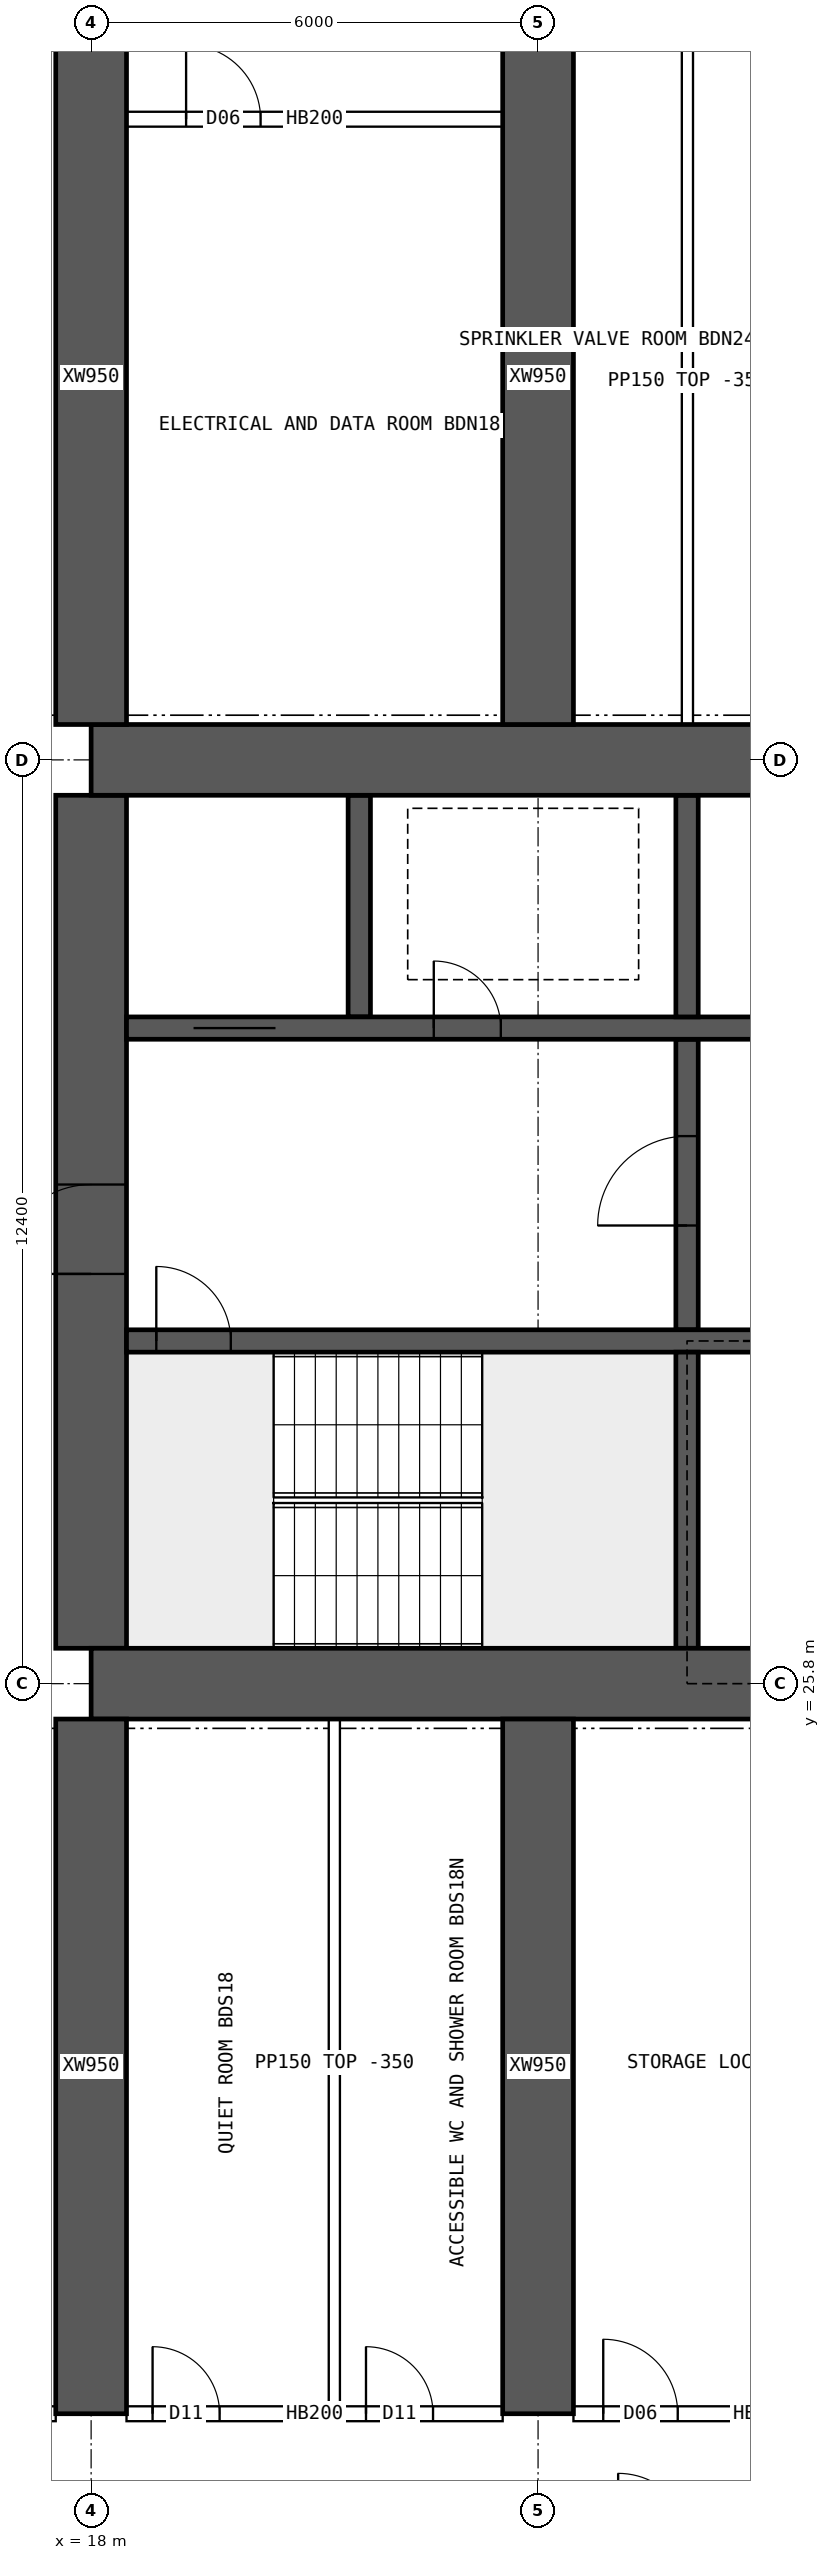
"""IFC4 building model, lengths in metres.
Left out: names, types, materials, properties, quantities, classifications, styles, units other than length and angle.
Written with IfcOpenShell. Run it as: python <this file> out.ifc"""

import sys

from ifc_helpers import new_model, si_unit, direction, frame, frame_2d, origin, place, context, subcontext, project, spatial, rectangle, extrude, element, fill, save


model = new_model("IFC4")
c1 = context("Model", 3, precision=1e-05, world=origin(), true_north=direction((0.0, 1.0)))
c2 = subcontext(c1, "Body", "Model", "MODEL_VIEW")
j1 = project(units=[si_unit("LENGTHUNIT", "METRE"), si_unit("PLANEANGLEUNIT", "RADIAN")], contexts=[c1])
p1 = place(None, origin())
s1 = spatial("IfcSite", under=j1, at=p1, CompositionType="ELEMENT")
p2 = place(p1, origin())
s2 = spatial("IfcBuilding", under=s1, at=p2, CompositionType="ELEMENT")
p3 = place(p2, frame((0.0, 0.0, 129.4)))
s3 = spatial("IfcBuildingStorey", under=s2, at=p3, CompositionType="ELEMENT", Elevation=129.4)
for number, where, z_axis, x_axis in (
    (1, (18.0, 25.8, 0.0), (0.0, 0.0, 1.0), (1.0, 0.0, 0.0)),
    (2, (18.0, 38.2, 0.0), (0.0, 0.0, 1.0), (1.0, 0.0, 0.0)),
):
    element("IfcWall", number, at=place(p3, frame(where, z_axis=z_axis, x_axis=x_axis)), inside=s3, PredefinedType="SHEAR", context=c2, shape_type="SweptSolid", body=[
        extrude(rectangle(XDim=48.0, YDim=0.95, at=frame_2d((24.0, 0.0))), origin(), (0.0, 0.0, 1.0), 3.75),
    ])
p4 = place(p3, frame((18.0, 26.275, 0.0), z_axis=(0.0, 0.0, 1.0), x_axis=(0.0, 1.0, 0.0)))
e3 = element("IfcWall", 3, at=p4, inside=s3, PredefinedType="SHEAR", context=c2, shape_type="SweptSolid", body=[
    extrude(rectangle(XDim=11.45, YDim=0.95, at=frame_2d((5.725, 0.0))), origin(), (0.0, 0.0, 1.0), 3.75),
])
p5 = place(p4, frame((5.025, 0.0, 0.0)))
e4 = element("IfcOpeningElement", 4, at=p5, cuts=e3, PredefinedType="OPENING", context=c2, shape_type="SweptSolid", body=[
    extrude(rectangle(XDim=1.2, YDim=2.1, at=frame_2d((0.6, 1.05))), frame((0.0, 0.485, 0.0), z_axis=(0.0, -1.0, 0.0), x_axis=(1.0, 0.0, 0.0)), (0.0, 0.0, 1.0), 0.97),
])
p6 = place(p3, frame((18.475, 30.4, 0.0), z_axis=(0.0, 0.0, 1.0), x_axis=(1.0, 0.0, 0.0)))
e5 = element("IfcWall", 5, at=p6, inside=s3, PredefinedType="SHEAR", context=c2, shape_type="SweptSolid", body=[
    extrude(rectangle(XDim=47.05, YDim=0.3, at=frame_2d((23.525, 0.0))), origin(), (0.0, 0.0, 1.0), 3.75),
])
p7 = place(p6, frame((0.4, 0.0, 0.0)))
e6 = element("IfcOpeningElement", 6, at=p7, cuts=e5, PredefinedType="OPENING", context=c2, shape_type="SweptSolid", body=[
    extrude(rectangle(XDim=1.0, YDim=2.1, at=frame_2d((0.5, 1.05))), frame((0.0, 0.16, 0.0), z_axis=(0.0, -1.0, 0.0), x_axis=(1.0, 0.0, 0.0)), (0.0, 0.0, 1.0), 0.32),
])
p8 = place(p6, frame((45.65, 0.0, 0.0)))
e7 = element("IfcOpeningElement", 7, at=p8, cuts=e5, PredefinedType="OPENING", context=c2, shape_type="SweptSolid", body=[
    extrude(rectangle(XDim=1.0, YDim=2.1, at=frame_2d((0.5, 1.05))), frame((0.0, 0.16, 0.0), z_axis=(0.0, -1.0, 0.0), x_axis=(1.0, 0.0, 0.0)), (0.0, 0.0, 1.0), 0.32),
])
p9 = place(p6, frame((8.275, 0.0, 0.0)))
e8 = element("IfcOpeningElement", 8, at=p9, cuts=e5, PredefinedType="OPENING", context=c2, shape_type="SweptSolid", body=[
    extrude(rectangle(XDim=1.1, YDim=2.1, at=frame_2d((0.55, 1.05))), frame((0.0, 0.16, 0.0), z_axis=(0.0, -1.0, 0.0), x_axis=(1.0, 0.0, 0.0)), (0.0, 0.0, 1.0), 0.32),
])
p10 = place(p6, frame((10.875, 0.0, 0.0)))
e9 = element("IfcOpeningElement", 9, at=p10, cuts=e5, PredefinedType="OPENING", context=c2, shape_type="SweptSolid", body=[
    extrude(rectangle(XDim=1.1, YDim=2.1, at=frame_2d((0.55, 1.05))), frame((0.0, 0.16, 0.0), z_axis=(0.0, -1.0, 0.0), x_axis=(1.0, 0.0, 0.0)), (0.0, 0.0, 1.0), 0.32),
])
p11 = place(p6, frame((13.475, 0.0, 0.0)))
e10 = element("IfcOpeningElement", 10, at=p11, cuts=e5, PredefinedType="OPENING", context=c2, shape_type="SweptSolid", body=[
    extrude(rectangle(XDim=1.1, YDim=2.1, at=frame_2d((0.55, 1.05))), frame((0.0, 0.16, 0.0), z_axis=(0.0, -1.0, 0.0), x_axis=(1.0, 0.0, 0.0)), (0.0, 0.0, 1.0), 0.32),
])
p12 = place(p6, frame((16.075, 0.0, 0.0)))
e11 = element("IfcOpeningElement", 11, at=p12, cuts=e5, PredefinedType="OPENING", context=c2, shape_type="SweptSolid", body=[
    extrude(rectangle(XDim=1.1, YDim=2.1, at=frame_2d((0.55, 1.05))), frame((0.0, 0.16, 0.0), z_axis=(0.0, -1.0, 0.0), x_axis=(1.0, 0.0, 0.0)), (0.0, 0.0, 1.0), 0.32),
])
p13 = place(p6, frame((18.85, 0.0, 0.0)))
e12 = element("IfcOpeningElement", 12, at=p13, cuts=e5, PredefinedType="OPENING", context=c2, shape_type="SweptSolid", body=[
    extrude(rectangle(XDim=0.9, YDim=2.1, at=frame_2d((0.45, 1.05))), frame((0.0, 0.16, 0.0), z_axis=(0.0, -1.0, 0.0), x_axis=(1.0, 0.0, 0.0)), (0.0, 0.0, 1.0), 0.32),
])
p14 = place(p6, frame((30.142, 0.0, 0.0)))
e13 = element("IfcOpeningElement", 13, at=p14, cuts=e5, PredefinedType="OPENING", context=c2, shape_type="SweptSolid", body=[
    extrude(rectangle(XDim=1.1, YDim=2.1, at=frame_2d((0.55, 1.05))), frame((0.0, 0.16, 0.0), z_axis=(0.0, -1.0, 0.0), x_axis=(1.0, 0.0, 0.0)), (0.0, 0.0, 1.0), 0.32),
])
p15 = place(p6, frame((33.675, 0.0, 0.0)))
e14 = element("IfcOpeningElement", 14, at=p15, cuts=e5, PredefinedType="OPENING", context=c2, shape_type="SweptSolid", body=[
    extrude(rectangle(XDim=1.1, YDim=2.1, at=frame_2d((0.55, 1.05))), frame((0.0, 0.16, 0.0), z_axis=(0.0, -1.0, 0.0), x_axis=(1.0, 0.0, 0.0)), (0.0, 0.0, 1.0), 0.32),
])
p16 = place(p6, frame((37.208, 0.0, 0.0)))
e15 = element("IfcOpeningElement", 15, at=p16, cuts=e5, PredefinedType="OPENING", context=c2, shape_type="SweptSolid", body=[
    extrude(rectangle(XDim=1.1, YDim=2.1, at=frame_2d((0.55, 1.05))), frame((0.0, 0.16, 0.0), z_axis=(0.0, -1.0, 0.0), x_axis=(1.0, 0.0, 0.0)), (0.0, 0.0, 1.0), 0.32),
])
p17 = place(p3, frame((18.475, 34.6, 0.0), z_axis=(0.0, 0.0, 1.0), x_axis=(1.0, 0.0, 0.0)))
e16 = element("IfcWall", 16, at=p17, inside=s3, PredefinedType="SHEAR", context=c2, shape_type="SweptSolid", body=[
    extrude(rectangle(XDim=47.05, YDim=0.3, at=frame_2d((23.525, 0.0))), origin(), (0.0, 0.0, 1.0), 3.75),
])
p18 = place(p17, frame((0.9, 0.0, 0.0)))
e17 = element("IfcOpeningElement", 17, at=p18, cuts=e16, PredefinedType="OPENING", context=c2, shape_type="SweptSolid", body=[
    extrude(rectangle(XDim=1.1, YDim=2.1, at=frame_2d((0.55, 1.05))), frame((0.0, 0.16, 0.0), z_axis=(0.0, -1.0, 0.0), x_axis=(1.0, 0.0, 0.0)), (0.0, 0.0, 1.0), 0.32),
])
p19 = place(p17, frame((45.05, 0.0, 0.0)))
e18 = element("IfcOpeningElement", 18, at=p19, cuts=e16, PredefinedType="OPENING", context=c2, shape_type="SweptSolid", body=[
    extrude(rectangle(XDim=1.1, YDim=2.1, at=frame_2d((0.55, 1.05))), frame((0.0, 0.16, 0.0), z_axis=(0.0, -1.0, 0.0), x_axis=(1.0, 0.0, 0.0)), (0.0, 0.0, 1.0), 0.32),
])
p20 = place(p17, frame((4.125, 0.0, 0.0)))
e19 = element("IfcOpeningElement", 19, at=p20, cuts=e16, PredefinedType="OPENING", context=c2, shape_type="SweptSolid", body=[
    extrude(rectangle(XDim=0.9, YDim=2.1, at=frame_2d((0.45, 1.05))), frame((0.0, 0.16, 0.0), z_axis=(0.0, -1.0, 0.0), x_axis=(1.0, 0.0, 0.0)), (0.0, 0.0, 1.0), 0.32),
])
p21 = place(p17, frame((42.025, 0.0, 0.0)))
e20 = element("IfcOpeningElement", 20, at=p21, cuts=e16, PredefinedType="OPENING", context=c2, shape_type="SweptSolid", body=[
    extrude(rectangle(XDim=0.9, YDim=2.1, at=frame_2d((0.45, 1.05))), frame((0.0, 0.16, 0.0), z_axis=(0.0, -1.0, 0.0), x_axis=(1.0, 0.0, 0.0)), (0.0, 0.0, 1.0), 0.32),
])
p22 = place(p17, frame((8.9, 0.0, 0.0)))
e21 = element("IfcOpeningElement", 21, at=p22, cuts=e16, PredefinedType="OPENING", context=c2, shape_type="SweptSolid", body=[
    extrude(rectangle(XDim=0.9, YDim=2.1, at=frame_2d((0.45, 1.05))), frame((0.0, 0.16, 0.0), z_axis=(0.0, -1.0, 0.0), x_axis=(1.0, 0.0, 0.0)), (0.0, 0.0, 1.0), 0.32),
])
p23 = place(p17, frame((12.874, 0.0, 0.0)))
e22 = element("IfcOpeningElement", 22, at=p23, cuts=e16, PredefinedType="OPENING", context=c2, shape_type="SweptSolid", body=[
    extrude(rectangle(XDim=0.9, YDim=2.1, at=frame_2d((0.45, 1.05))), frame((0.0, 0.16, 0.0), z_axis=(0.0, -1.0, 0.0), x_axis=(1.0, 0.0, 0.0)), (0.0, 0.0, 1.0), 0.32),
])
p24 = place(p17, frame((16.521, 0.0, 0.0)))
e23 = element("IfcOpeningElement", 23, at=p24, cuts=e16, PredefinedType="OPENING", context=c2, shape_type="SweptSolid", body=[
    extrude(rectangle(XDim=0.9, YDim=2.1, at=frame_2d((0.45, 1.05))), frame((0.0, 0.16, 0.0), z_axis=(0.0, -1.0, 0.0), x_axis=(1.0, 0.0, 0.0)), (0.0, 0.0, 1.0), 0.32),
])
p25 = place(p17, frame((20.28, 0.0, 0.0)))
e24 = element("IfcOpeningElement", 24, at=p25, cuts=e16, PredefinedType="OPENING", context=c2, shape_type="SweptSolid", body=[
    extrude(rectangle(XDim=0.9, YDim=2.1, at=frame_2d((0.45, 1.05))), frame((0.0, 0.16, 0.0), z_axis=(0.0, -1.0, 0.0), x_axis=(1.0, 0.0, 0.0)), (0.0, 0.0, 1.0), 0.32),
])
p26 = place(p17, frame((24.686, 0.0, 0.0)))
e25 = element("IfcOpeningElement", 25, at=p26, cuts=e16, PredefinedType="OPENING", context=c2, shape_type="SweptSolid", body=[
    extrude(rectangle(XDim=0.9, YDim=2.1, at=frame_2d((0.45, 1.05))), frame((0.0, 0.16, 0.0), z_axis=(0.0, -1.0, 0.0), x_axis=(1.0, 0.0, 0.0)), (0.0, 0.0, 1.0), 0.32),
])
p27 = place(p17, frame((27.483, 0.0, 0.0)))
e26 = element("IfcOpeningElement", 26, at=p27, cuts=e16, PredefinedType="OPENING", context=c2, shape_type="SweptSolid", body=[
    extrude(rectangle(XDim=0.9, YDim=2.1, at=frame_2d((0.45, 1.05))), frame((0.0, 0.16, 0.0), z_axis=(0.0, -1.0, 0.0), x_axis=(1.0, 0.0, 0.0)), (0.0, 0.0, 1.0), 0.32),
])
p28 = place(p17, frame((33.604, 0.0, 0.0)))
e27 = element("IfcOpeningElement", 27, at=p28, cuts=e16, PredefinedType="OPENING", context=c2, shape_type="SweptSolid", body=[
    extrude(rectangle(XDim=0.9, YDim=2.1, at=frame_2d((0.45, 1.05))), frame((0.0, 0.16, 0.0), z_axis=(0.0, -1.0, 0.0), x_axis=(1.0, 0.0, 0.0)), (0.0, 0.0, 1.0), 0.32),
])
p29 = place(p3, frame((26.0, 26.275, 0.0), z_axis=(0.0, 0.0, 1.0), x_axis=(0.0, 1.0, 0.0)))
e28 = element("IfcWall", 28, at=p29, inside=s3, PredefinedType="SHEAR", context=c2, shape_type="SweptSolid", body=[
    extrude(rectangle(XDim=3.975, YDim=0.3, at=frame_2d((1.988, 0.0))), origin(), (0.0, 0.0, 1.0), 3.75),
])
p30 = place(p3, frame((26.0, 30.55, 0.0), z_axis=(0.0, 0.0, 1.0), x_axis=(0.0, 1.0, 0.0)))
e29 = element("IfcWall", 29, at=p30, inside=s3, PredefinedType="SHEAR", context=c2, shape_type="SweptSolid", body=[
    extrude(rectangle(XDim=3.9, YDim=0.3, at=frame_2d((1.95, 0.0))), origin(), (0.0, 0.0, 1.0), 3.75),
])
p31 = place(p30, frame((1.4, 0.0, 0.0)))
e30 = element("IfcOpeningElement", 30, at=p31, cuts=e29, PredefinedType="OPENING", context=c2, shape_type="SweptSolid", body=[
    extrude(rectangle(XDim=1.2, YDim=2.1, at=frame_2d((0.6, 1.05))), frame((0.0, 0.16, 0.0), z_axis=(0.0, -1.0, 0.0), x_axis=(1.0, 0.0, 0.0)), (0.0, 0.0, 1.0), 0.32),
])
for number, where, z_axis, x_axis in (
    (31, (21.6, 34.75, 0.0), (0.0, 0.0, 1.0), (0.0, 1.0, 0.0)),
    (32, (26.0, 34.75, 0.0), (0.0, 0.0, 1.0), (0.0, 1.0, 0.0)),
):
    element("IfcWall", number, at=place(p3, frame(where, z_axis=z_axis, x_axis=x_axis)), inside=s3, PredefinedType="SHEAR", context=c2, shape_type="SweptSolid", body=[
        extrude(rectangle(XDim=2.975, YDim=0.3, at=frame_2d((1.488, 0.0))), origin(), (0.0, 0.0, 1.0), 3.75),
    ])
for number, where, z_axis, x_axis in (
    (33, (18.0, 16.0, 0.0), (0.0, 0.0, 1.0), (0.0, 1.0, 0.0)),
    (34, (18.0, 38.675, 0.0), (0.0, 0.0, 1.0), (0.0, 1.0, 0.0)),
    (35, (24.0, 16.0, 0.0), (0.0, 0.0, 1.0), (0.0, 1.0, 0.0)),
    (36, (24.0, 38.675, 0.0), (0.0, 0.0, 1.0), (0.0, 1.0, 0.0)),
):
    element("IfcWall", number, at=place(p3, frame(where, z_axis=z_axis, x_axis=x_axis)), inside=s3, PredefinedType="SHEAR", context=c2, shape_type="SweptSolid", body=[
        extrude(rectangle(XDim=9.325, YDim=0.95, at=frame_2d((4.663, 0.0))), origin(), (0.0, 0.0, 1.0), 3.75),
    ])
p32 = place(p3, frame((12.475, 16.0, 0.0), z_axis=(0.0, 0.0, 1.0), x_axis=(1.0, 0.0, 0.0)))
e37 = element("IfcWall", 37, at=p32, inside=s3, PredefinedType="SOLIDWALL", context=c2, shape_type="SweptSolid", body=[
    extrude(rectangle(XDim=5.05, YDim=0.2, at=frame_2d((2.525, 0.0))), origin(), (0.0, 0.0, 1.0), 3.4),
])
p33 = place(p32, frame((3.325, 0.0, 0.0)))
e38 = element("IfcOpeningElement", 38, at=p33, cuts=e37, PredefinedType="OPENING", context=c2, shape_type="SweptSolid", body=[
    extrude(rectangle(XDim=1.6, YDim=2.1, at=frame_2d((0.8, 1.05))), frame((0.0, 0.11, 0.0), z_axis=(0.0, -1.0, 0.0), x_axis=(1.0, 0.0, 0.0)), (0.0, 0.0, 1.0), 0.22),
])
p34 = place(p3, frame((18.475, 16.0, 0.0), z_axis=(0.0, 0.0, 1.0), x_axis=(1.0, 0.0, 0.0)))
e39 = element("IfcWall", 39, at=p34, inside=s3, PredefinedType="SOLIDWALL", context=c2, shape_type="SweptSolid", body=[
    extrude(rectangle(XDim=5.05, YDim=0.2, at=frame_2d((2.525, 0.0))), origin(), (0.0, 0.0, 1.0), 3.4),
])
p35 = place(p34, frame((0.35, 0.0, 0.0)))
e40 = element("IfcOpeningElement", 40, at=p35, cuts=e39, PredefinedType="OPENING", context=c2, shape_type="SweptSolid", body=[
    extrude(rectangle(XDim=0.9, YDim=2.1, at=frame_2d((0.45, 1.05))), frame((0.0, 0.11, 0.0), z_axis=(0.0, -1.0, 0.0), x_axis=(1.0, 0.0, 0.0)), (0.0, 0.0, 1.0), 0.22),
])
p36 = place(p34, frame((3.215, 0.0, 0.0)))
e41 = element("IfcOpeningElement", 41, at=p36, cuts=e39, PredefinedType="OPENING", context=c2, shape_type="SweptSolid", body=[
    extrude(rectangle(XDim=0.9, YDim=2.1, at=frame_2d((0.45, 1.05))), frame((0.0, 0.11, 0.0), z_axis=(0.0, -1.0, 0.0), x_axis=(1.0, 0.0, 0.0)), (0.0, 0.0, 1.0), 0.22),
])
p37 = place(p3, frame((24.475, 16.0, 0.0), z_axis=(0.0, 0.0, 1.0), x_axis=(1.0, 0.0, 0.0)))
e42 = element("IfcWall", 42, at=p37, inside=s3, PredefinedType="SOLIDWALL", context=c2, shape_type="SweptSolid", body=[
    extrude(rectangle(XDim=5.05, YDim=0.2, at=frame_2d((2.525, 0.0))), origin(), (0.0, 0.0, 1.0), 3.4),
])
p38 = place(p37, frame((0.4, 0.0, 0.0)))
e43 = element("IfcOpeningElement", 43, at=p38, cuts=e42, PredefinedType="OPENING", context=c2, shape_type="SweptSolid", body=[
    extrude(rectangle(XDim=1.0, YDim=2.1, at=frame_2d((0.5, 1.05))), frame((0.0, 0.11, 0.0), z_axis=(0.0, -1.0, 0.0), x_axis=(1.0, 0.0, 0.0)), (0.0, 0.0, 1.0), 0.22),
])
p39 = place(p3, frame((21.265, 16.1, 0.0), z_axis=(0.0, 0.0, 1.0), x_axis=(0.0, 1.0, 0.0)))
e44 = element("IfcWall", 44, at=p39, inside=s3, PredefinedType="PARTITIONING", context=c2, shape_type="SweptSolid", body=[
    extrude(rectangle(XDim=9.225, YDim=0.15, at=frame_2d((4.612, 0.0))), origin(), (0.0, 0.0, 1.0), 3.4),
])
p40 = place(p3, frame((18.475, 46.8, 0.0), z_axis=(0.0, 0.0, 1.0), x_axis=(1.0, 0.0, 0.0)))
e45 = element("IfcWall", 45, at=p40, inside=s3, PredefinedType="SOLIDWALL", context=c2, shape_type="SweptSolid", body=[
    extrude(rectangle(XDim=5.05, YDim=0.2, at=frame_2d((2.525, 0.0))), origin(), (0.0, 0.0, 1.0), 3.4),
])
p41 = place(p40, frame((0.8, 0.0, 0.0)))
e46 = element("IfcOpeningElement", 46, at=p41, cuts=e45, PredefinedType="OPENING", context=c2, shape_type="SweptSolid", body=[
    extrude(rectangle(XDim=1.0, YDim=2.1, at=frame_2d((0.5, 1.05))), frame((0.0, 0.11, 0.0), z_axis=(0.0, -1.0, 0.0), x_axis=(1.0, 0.0, 0.0)), (0.0, 0.0, 1.0), 0.22),
])
p42 = place(p3, frame((26.005, 38.675, 0.0), z_axis=(0.0, 0.0, 1.0), x_axis=(0.0, 1.0, 0.0)))
e47 = element("IfcWall", 47, at=p42, inside=s3, PredefinedType="PARTITIONING", context=c2, shape_type="SweptSolid", body=[
    extrude(rectangle(XDim=9.225, YDim=0.15, at=frame_2d((4.612, 0.0))), origin(), (0.0, 0.0, 1.0), 3.4),
])
p43 = place(p5, origin())
e48 = element("IfcDoor", 48, at=p43, inside=s3, OperationType="SINGLE_SWING_LEFT", PredefinedType="DOOR", context=c2, shape_type="SweptSolid", body=[
    extrude(rectangle(XDim=1.2, YDim=2.1, at=frame_2d((0.6, 1.05))), frame((0.0, 0.025, 0.0), z_axis=(0.0, -1.0, 0.0), x_axis=(1.0, 0.0, 0.0)), (0.0, 0.0, 1.0), 0.05),
])
fill(e4, e48)
p44 = place(p7, origin())
e49 = element("IfcDoor", 49, at=p44, inside=s3, OperationType="SINGLE_SWING_LEFT", PredefinedType="DOOR", context=c2, shape_type="SweptSolid", body=[
    extrude(rectangle(XDim=1.0, YDim=2.1, at=frame_2d((0.5, 1.05))), frame((0.0, 0.025, 0.0), z_axis=(0.0, -1.0, 0.0), x_axis=(1.0, 0.0, 0.0)), (0.0, 0.0, 1.0), 0.05),
])
fill(e6, e49)
p45 = place(p18, origin())
e50 = element("IfcDoor", 50, at=p45, inside=s3, OperationType="DOUBLE_DOOR_SLIDING", PredefinedType="DOOR", context=c2, shape_type="SweptSolid", body=[
    extrude(rectangle(XDim=1.1, YDim=2.1, at=frame_2d((0.55, 1.05))), frame((0.0, 0.025, 0.0), z_axis=(0.0, -1.0, 0.0), x_axis=(1.0, 0.0, 0.0)), (0.0, 0.0, 1.0), 0.05),
])
fill(e17, e50)
p46 = place(p20, origin())
e51 = element("IfcDoor", 51, at=p46, inside=s3, OperationType="SINGLE_SWING_LEFT", PredefinedType="DOOR", context=c2, shape_type="SweptSolid", body=[
    extrude(rectangle(XDim=0.9, YDim=2.1, at=frame_2d((0.45, 1.05))), frame((0.0, 0.025, 0.0), z_axis=(0.0, -1.0, 0.0), x_axis=(1.0, 0.0, 0.0)), (0.0, 0.0, 1.0), 0.05),
])
fill(e19, e51)
p47 = place(p31, origin())
e52 = element("IfcDoor", 52, at=p47, inside=s3, OperationType="SINGLE_SWING_LEFT", PredefinedType="DOOR", context=c2, shape_type="SweptSolid", body=[
    extrude(rectangle(XDim=1.2, YDim=2.1, at=frame_2d((0.6, 1.05))), frame((0.0, 0.025, 0.0), z_axis=(0.0, -1.0, 0.0), x_axis=(1.0, 0.0, 0.0)), (0.0, 0.0, 1.0), 0.05),
])
fill(e30, e52)
p48 = place(p9, origin())
e53 = element("IfcDoor", 53, at=p48, inside=s3, OperationType="DOUBLE_DOOR_SLIDING", PredefinedType="DOOR", context=c2, shape_type="SweptSolid", body=[
    extrude(rectangle(XDim=1.1, YDim=2.1, at=frame_2d((0.55, 1.05))), frame((0.0, 0.025, 0.0), z_axis=(0.0, -1.0, 0.0), x_axis=(1.0, 0.0, 0.0)), (0.0, 0.0, 1.0), 0.05),
])
fill(e8, e53)
p49 = place(p35, origin())
e54 = element("IfcDoor", 54, at=p49, inside=s3, OperationType="SINGLE_SWING_LEFT", PredefinedType="DOOR", context=c2, shape_type="SweptSolid", body=[
    extrude(rectangle(XDim=0.9, YDim=2.1, at=frame_2d((0.45, 1.05))), frame((0.0, 0.025, 0.0), z_axis=(0.0, -1.0, 0.0), x_axis=(1.0, 0.0, 0.0)), (0.0, 0.0, 1.0), 0.05),
])
fill(e40, e54)
p50 = place(p36, origin())
e55 = element("IfcDoor", 55, at=p50, inside=s3, OperationType="SINGLE_SWING_LEFT", PredefinedType="DOOR", context=c2, shape_type="SweptSolid", body=[
    extrude(rectangle(XDim=0.9, YDim=2.1, at=frame_2d((0.45, 1.05))), frame((0.0, 0.025, 0.0), z_axis=(0.0, -1.0, 0.0), x_axis=(1.0, 0.0, 0.0)), (0.0, 0.0, 1.0), 0.05),
])
fill(e41, e55)
p51 = place(p38, origin())
e56 = element("IfcDoor", 56, at=p51, inside=s3, OperationType="SINGLE_SWING_LEFT", PredefinedType="DOOR", context=c2, shape_type="SweptSolid", body=[
    extrude(rectangle(XDim=1.0, YDim=2.1, at=frame_2d((0.5, 1.05))), frame((0.0, 0.025, 0.0), z_axis=(0.0, -1.0, 0.0), x_axis=(1.0, 0.0, 0.0)), (0.0, 0.0, 1.0), 0.05),
])
fill(e43, e56)
p52 = place(p41, origin())
e57 = element("IfcDoor", 57, at=p52, inside=s3, OperationType="SINGLE_SWING_LEFT", PredefinedType="DOOR", context=c2, shape_type="SweptSolid", body=[
    extrude(rectangle(XDim=1.0, YDim=2.1, at=frame_2d((0.5, 1.05))), frame((0.0, 0.025, 0.0), z_axis=(0.0, -1.0, 0.0), x_axis=(1.0, 0.0, 0.0)), (0.0, 0.0, 1.0), 0.05),
])
fill(e46, e57)
save(model, sys.argv[1])
